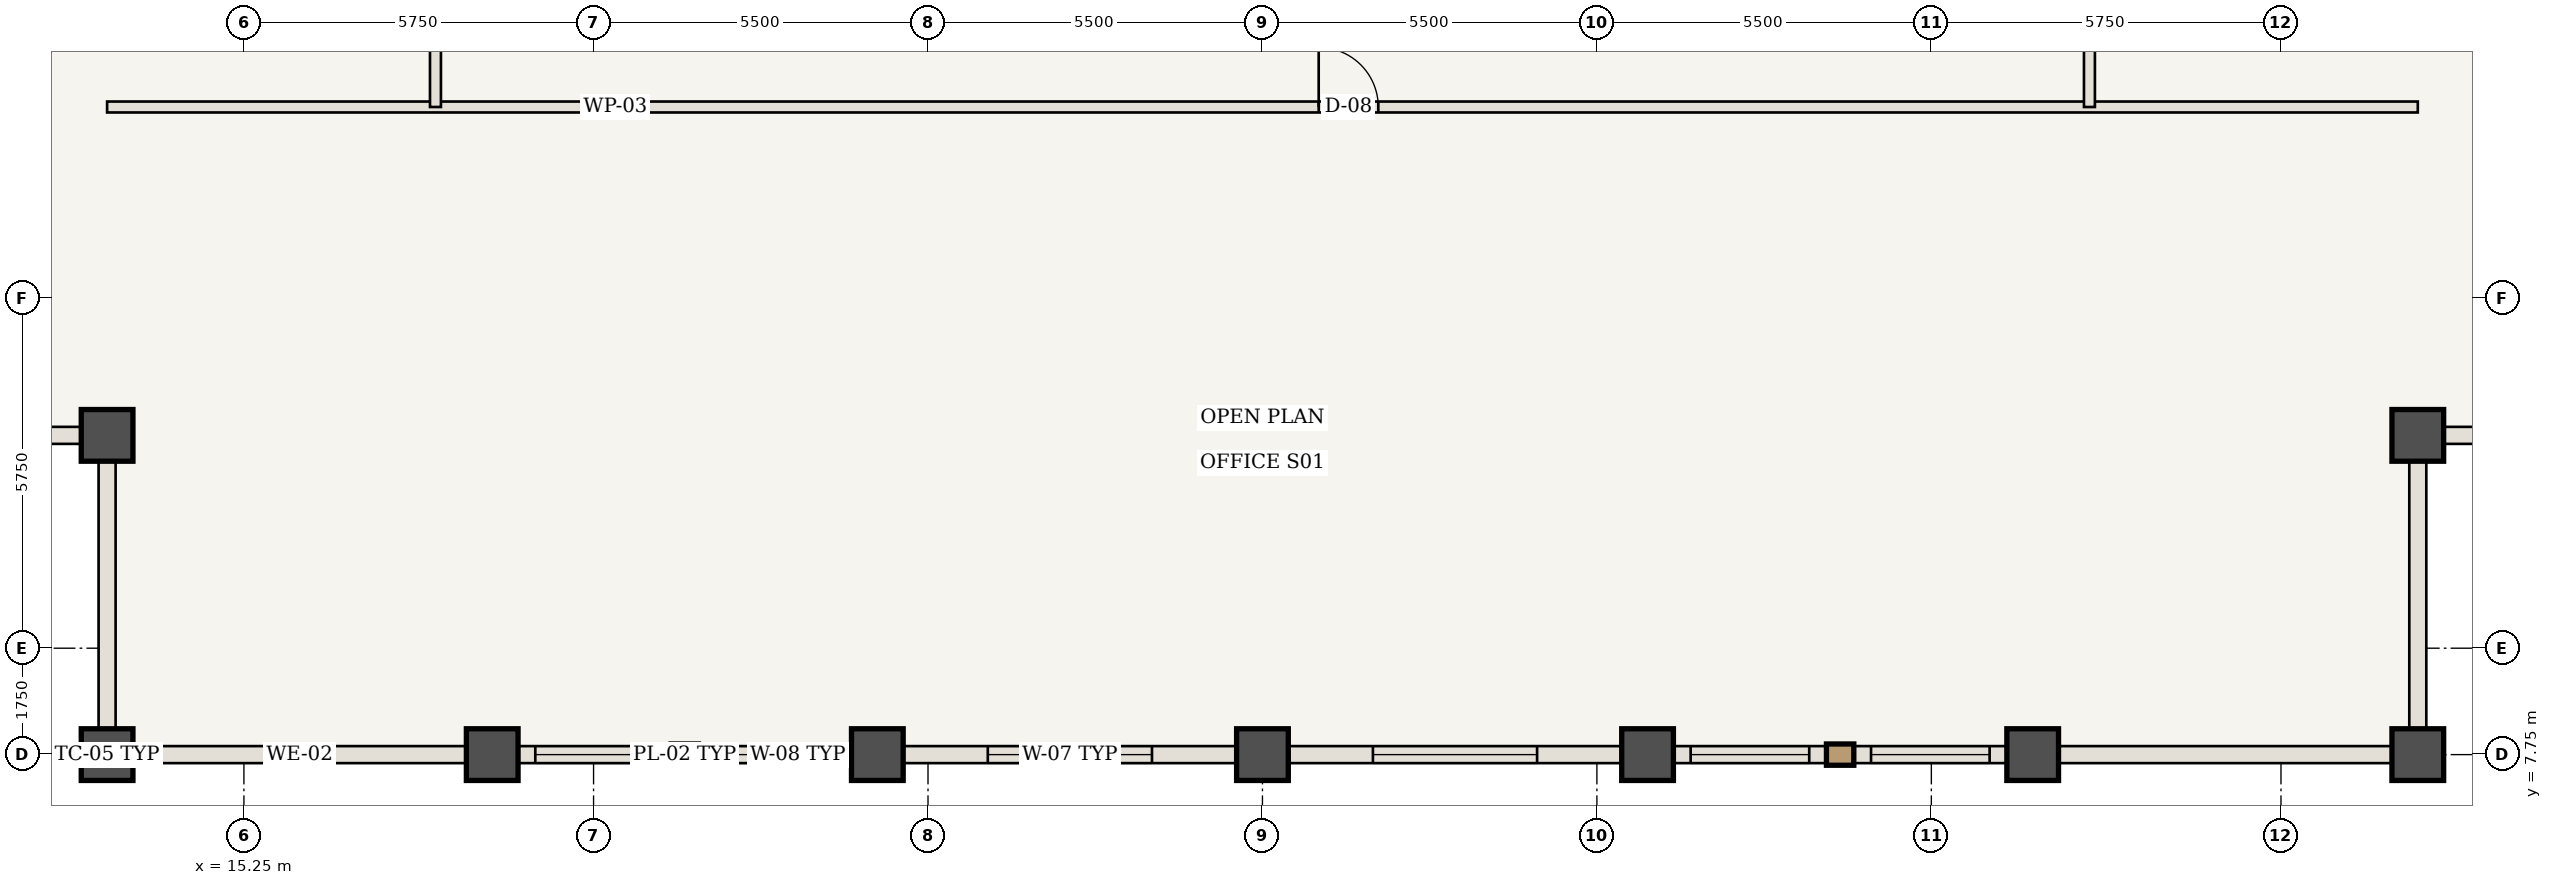
"""IFC4 building model, lengths in metres.
Left out: names, types, materials, properties, quantities, classifications, styles, units other than length and angle.
Written with IfcOpenShell. Run it as: python <this file> out.ifc"""

import sys

from ifc_helpers import new_model, si_unit, direction, frame, frame_2d, origin, origin_2d, place, context, subcontext, project, spatial, rectangle, extrude, element, fill, save


model = new_model("IFC4")
c1 = context("Model", 3, precision=1e-05, world=origin(), true_north=direction((0.0, 1.0)))
c2 = subcontext(c1, "Body", "Model", "MODEL_VIEW")
j1 = project(units=[si_unit("LENGTHUNIT", "METRE"), si_unit("PLANEANGLEUNIT", "RADIAN")], contexts=[c1])
p1 = place(None, origin())
s1 = spatial("IfcSite", under=j1, at=p1, CompositionType="ELEMENT")
p2 = place(p1, origin())
s2 = spatial("IfcBuilding", under=s1, at=p2, CompositionType="ELEMENT")
p3 = place(p2, frame((0.0, 0.0, 194.6)))
s3 = spatial("IfcBuildingStorey", under=s2, at=p3, CompositionType="ELEMENT", Elevation=194.6)
for number, where, z_axis, x_axis in (
    (1, (13.0, 7.75, 0.0), (0.0, 0.0, 1.0), (1.0, 0.0, 0.0)),
    (2, (13.0, 13.0, 0.0), (0.0, 0.0, 1.0), (1.0, 0.0, 0.0)),
    (3, (51.0, 7.75, 0.0), (0.0, 0.0, 1.0), (1.0, 0.0, 0.0)),
    (4, (51.0, 13.0, 0.0), (0.0, 0.0, 1.0), (1.0, 0.0, 0.0)),
    (5, (19.333, 7.75, 0.0), (0.0, 0.0, 1.0), (1.0, 0.0, 0.0)),
    (6, (25.667, 7.75, 0.0), (0.0, 0.0, 1.0), (1.0, 0.0, 0.0)),
    (7, (32.0, 7.75, 0.0), (0.0, 0.0, 1.0), (1.0, 0.0, 0.0)),
    (8, (38.333, 7.75, 0.0), (0.0, 0.0, 1.0), (1.0, 0.0, 0.0)),
    (9, (44.667, 7.75, 0.0), (0.0, 0.0, 1.0), (1.0, 0.0, 0.0)),
):
    element("IfcColumn", number, at=place(p3, frame(where, z_axis=z_axis, x_axis=x_axis)), inside=s3, PredefinedType="COLUMN", context=c2, shape_type="SweptSolid", body=[
        extrude(rectangle(XDim=0.85, YDim=0.85, at=origin_2d()), origin(), (0.0, 0.0, 1.0), 3.85),
    ])
p4 = place(p3, frame((13.0, 18.4, 0.0), z_axis=(0.0, 0.0, 1.0), x_axis=(1.0, 0.0, 0.0)))
e10 = element("IfcWall", 10, at=p4, inside=s3, PredefinedType="STANDARD", context=c2, shape_type="SweptSolid", body=[
    extrude(rectangle(XDim=38.0, YDim=0.18, at=frame_2d((19.0, 0.0))), origin(), (0.0, 0.0, 1.0), 3.685),
])
p5 = place(p4, frame((19.925, 0.0, 0.0)))
e11 = element("IfcOpeningElement", 11, at=p5, cuts=e10, PredefinedType="OPENING", context=c2, shape_type="SweptSolid", body=[
    extrude(rectangle(XDim=0.98, YDim=2.2, at=frame_2d((0.49, 1.1))), frame((0.0, 0.1, 0.0), z_axis=(0.0, -1.0, 0.0), x_axis=(1.0, 0.0, 0.0)), (0.0, 0.0, 1.0), 0.2),
])
p6 = place(p3, frame((18.4, 18.4, 0.0), z_axis=(0.0, 0.0, 1.0), x_axis=(0.0, 1.0, 0.0)))
e12 = element("IfcWall", 12, at=p6, inside=s3, PredefinedType="STANDARD", context=c2, shape_type="SweptSolid", body=[
    extrude(rectangle(XDim=6.317, YDim=0.18, at=frame_2d((3.158, 0.0))), origin(), (0.0, 0.0, 1.0), 3.685),
])
p7 = place(p6, frame((1.208, 0.0, 0.0)))
e13 = element("IfcOpeningElement", 13, at=p7, cuts=e12, PredefinedType="OPENING", context=c2, shape_type="SweptSolid", body=[
    extrude(rectangle(XDim=0.98, YDim=2.2, at=frame_2d((0.49, 1.1))), frame((0.0, 0.1, 0.0), z_axis=(0.0, -1.0, 0.0), x_axis=(1.0, 0.0, 0.0)), (0.0, 0.0, 1.0), 0.2),
])
p8 = place(p3, frame((45.6, 18.4, 0.0), z_axis=(0.0, 0.0, 1.0), x_axis=(0.0, 1.0, 0.0)))
e14 = element("IfcWall", 14, at=p8, inside=s3, PredefinedType="STANDARD", context=c2, shape_type="SweptSolid", body=[
    extrude(rectangle(XDim=13.4, YDim=0.18, at=frame_2d((6.7, 0.0))), origin(), (0.0, 0.0, 1.0), 3.685),
])
p9 = place(p8, frame((6.2, 0.0, 0.0)))
e15 = element("IfcOpeningElement", 15, at=p9, cuts=e14, PredefinedType="OPENING", context=c2, shape_type="SweptSolid", body=[
    extrude(rectangle(XDim=0.98, YDim=2.2, at=frame_2d((0.49, 1.1))), frame((0.0, 0.1, 0.0), z_axis=(0.0, -1.0, 0.0), x_axis=(1.0, 0.0, 0.0)), (0.0, 0.0, 1.0), 0.2),
])
p10 = place(p3, frame((19.333, 7.75, 0.0), z_axis=(0.0, 0.0, 1.0), x_axis=(-1.0, 0.0, 0.0)))
e16 = element("IfcWall", 16, at=p10, inside=s3, PredefinedType="USERDEFINED", context=c2, shape_type="SweptSolid", body=[
    extrude(rectangle(XDim=6.333, YDim=0.28, at=frame_2d((3.167, 0.0))), origin(), (0.0, 0.0, 1.0), 2.985),
])
p11 = place(p3, frame((25.667, 7.75, 0.0), z_axis=(0.0, 0.0, 1.0), x_axis=(-1.0, 0.0, 0.0)))
e17 = element("IfcWall", 17, at=p11, inside=s3, PredefinedType="USERDEFINED", context=c2, shape_type="SweptSolid", body=[
    extrude(rectangle(XDim=6.333, YDim=0.28, at=frame_2d((3.167, 0.0))), origin(), (0.0, 0.0, 1.0), 2.985),
])
p12 = place(p11, frame((0.708, 0.0, 0.85)))
e18 = element("IfcOpeningElement", 18, at=p12, cuts=e17, PredefinedType="OPENING", context=c2, shape_type="SweptSolid", body=[
    extrude(rectangle(XDim=1.95, YDim=1.935, at=frame_2d((0.975, 0.968))), frame((0.0, 0.15, 0.0), z_axis=(0.0, -1.0, 0.0), x_axis=(1.0, 0.0, 0.0)), (0.0, 0.0, 1.0), 0.3),
])
p13 = place(p11, frame((3.675, 0.0, 0.85)))
e19 = element("IfcOpeningElement", 19, at=p13, cuts=e17, PredefinedType="OPENING", context=c2, shape_type="SweptSolid", body=[
    extrude(rectangle(XDim=1.95, YDim=1.935, at=frame_2d((0.975, 0.968))), frame((0.0, 0.15, 0.0), z_axis=(0.0, -1.0, 0.0), x_axis=(1.0, 0.0, 0.0)), (0.0, 0.0, 1.0), 0.3),
])
p14 = place(p3, frame((32.0, 7.75, 0.0), z_axis=(0.0, 0.0, 1.0), x_axis=(-1.0, 0.0, 0.0)))
e20 = element("IfcWall", 20, at=p14, inside=s3, PredefinedType="USERDEFINED", context=c2, shape_type="SweptSolid", body=[
    extrude(rectangle(XDim=6.333, YDim=0.28, at=frame_2d((3.167, 0.0))), origin(), (0.0, 0.0, 1.0), 2.985),
])
p15 = place(p14, frame((1.817, 0.0, 0.85)))
e21 = element("IfcOpeningElement", 21, at=p15, cuts=e20, PredefinedType="OPENING", context=c2, shape_type="SweptSolid", body=[
    extrude(rectangle(XDim=2.7, YDim=1.935, at=frame_2d((1.35, 0.968))), frame((0.0, 0.15, 0.0), z_axis=(0.0, -1.0, 0.0), x_axis=(1.0, 0.0, 0.0)), (0.0, 0.0, 1.0), 0.3),
])
p16 = place(p3, frame((38.333, 7.75, 0.0), z_axis=(0.0, 0.0, 1.0), x_axis=(-1.0, 0.0, 0.0)))
e22 = element("IfcWall", 22, at=p16, inside=s3, PredefinedType="USERDEFINED", context=c2, shape_type="SweptSolid", body=[
    extrude(rectangle(XDim=6.333, YDim=0.28, at=frame_2d((3.167, 0.0))), origin(), (0.0, 0.0, 1.0), 2.985),
])
p17 = place(p16, frame((1.817, 0.0, 0.85)))
e23 = element("IfcOpeningElement", 23, at=p17, cuts=e22, PredefinedType="OPENING", context=c2, shape_type="SweptSolid", body=[
    extrude(rectangle(XDim=2.7, YDim=1.935, at=frame_2d((1.35, 0.968))), frame((0.0, 0.15, 0.0), z_axis=(0.0, -1.0, 0.0), x_axis=(1.0, 0.0, 0.0)), (0.0, 0.0, 1.0), 0.3),
])
p18 = place(p3, frame((44.667, 7.75, 0.0), z_axis=(0.0, 0.0, 1.0), x_axis=(-1.0, 0.0, 0.0)))
e24 = element("IfcWall", 24, at=p18, inside=s3, PredefinedType="USERDEFINED", context=c2, shape_type="SweptSolid", body=[
    extrude(rectangle(XDim=6.333, YDim=0.28, at=frame_2d((3.167, 0.0))), origin(), (0.0, 0.0, 1.0), 2.985),
])
p19 = place(p18, frame((0.708, 0.0, 0.85)))
e25 = element("IfcOpeningElement", 25, at=p19, cuts=e24, PredefinedType="OPENING", context=c2, shape_type="SweptSolid", body=[
    extrude(rectangle(XDim=1.95, YDim=1.935, at=frame_2d((0.975, 0.968))), frame((0.0, 0.15, 0.0), z_axis=(0.0, -1.0, 0.0), x_axis=(1.0, 0.0, 0.0)), (0.0, 0.0, 1.0), 0.3),
])
p20 = place(p18, frame((3.675, 0.0, 0.85)))
e26 = element("IfcOpeningElement", 26, at=p20, cuts=e24, PredefinedType="OPENING", context=c2, shape_type="SweptSolid", body=[
    extrude(rectangle(XDim=1.95, YDim=1.935, at=frame_2d((0.975, 0.968))), frame((0.0, 0.15, 0.0), z_axis=(0.0, -1.0, 0.0), x_axis=(1.0, 0.0, 0.0)), (0.0, 0.0, 1.0), 0.3),
])
p21 = place(p3, frame((51.0, 7.75, 0.0), z_axis=(0.0, 0.0, 1.0), x_axis=(-1.0, 0.0, 0.0)))
e27 = element("IfcWall", 27, at=p21, inside=s3, PredefinedType="USERDEFINED", context=c2, shape_type="SweptSolid", body=[
    extrude(rectangle(XDim=6.333, YDim=0.28, at=frame_2d((3.167, 0.0))), origin(), (0.0, 0.0, 1.0), 2.985),
])
for number, where, z_axis, x_axis in (
    (28, (13.0, 7.75, 0.0), (0.0, 0.0, 1.0), (0.0, 1.0, 0.0)),
    (29, (13.0, 13.0, 0.0), (0.0, 0.0, 1.0), (-1.0, 0.0, 0.0)),
    (30, (51.0, 13.0, 0.0), (0.0, 0.0, 1.0), (0.0, -1.0, 0.0)),
    (31, (56.25, 13.0, 0.0), (0.0, 0.0, 1.0), (-1.0, 0.0, 0.0)),
):
    element("IfcWall", number, at=place(p3, frame(where, z_axis=z_axis, x_axis=x_axis)), inside=s3, PredefinedType="USERDEFINED", context=c2, shape_type="SweptSolid", body=[
        extrude(rectangle(XDim=5.25, YDim=0.28, at=frame_2d((2.625, 0.0))), origin(), (0.0, 0.0, 1.0), 2.985),
    ])
p22 = place(p5, origin())
e32 = element("IfcDoor", 32, at=p22, inside=s3, OperationType="SINGLE_SWING_LEFT", PredefinedType="DOOR", context=c2, shape_type="SweptSolid", body=[
    extrude(rectangle(XDim=0.98, YDim=2.2, at=frame_2d((0.49, 1.1))), frame((0.0, 0.025, 0.0), z_axis=(0.0, -1.0, 0.0), x_axis=(1.0, 0.0, 0.0)), (0.0, 0.0, 1.0), 0.05),
])
fill(e11, e32)
p23 = place(p12, origin())
e33 = element("IfcWindow", 33, at=p23, inside=s3, PartitioningType="SINGLE_PANEL", PredefinedType="WINDOW", context=c2, shape_type="SweptSolid", body=[
    extrude(rectangle(XDim=1.95, YDim=1.935, at=frame_2d((0.975, 0.968))), frame((0.0, 0.03, 0.0), z_axis=(0.0, -1.0, 0.0), x_axis=(1.0, 0.0, 0.0)), (0.0, 0.0, 1.0), 0.06),
])
fill(e18, e33)
p24 = place(p13, origin())
e34 = element("IfcWindow", 34, at=p24, inside=s3, PartitioningType="SINGLE_PANEL", PredefinedType="WINDOW", context=c2, shape_type="SweptSolid", body=[
    extrude(rectangle(XDim=1.95, YDim=1.935, at=frame_2d((0.975, 0.968))), frame((0.0, 0.03, 0.0), z_axis=(0.0, -1.0, 0.0), x_axis=(1.0, 0.0, 0.0)), (0.0, 0.0, 1.0), 0.06),
])
fill(e19, e34)
p25 = place(p15, origin())
e35 = element("IfcWindow", 35, at=p25, inside=s3, PartitioningType="SINGLE_PANEL", PredefinedType="WINDOW", context=c2, shape_type="SweptSolid", body=[
    extrude(rectangle(XDim=2.7, YDim=1.935, at=frame_2d((1.35, 0.968))), frame((0.0, 0.03, 0.0), z_axis=(0.0, -1.0, 0.0), x_axis=(1.0, 0.0, 0.0)), (0.0, 0.0, 1.0), 0.06),
])
fill(e21, e35)
p26 = place(p17, origin())
e36 = element("IfcWindow", 36, at=p26, inside=s3, PartitioningType="SINGLE_PANEL", PredefinedType="WINDOW", context=c2, shape_type="SweptSolid", body=[
    extrude(rectangle(XDim=2.7, YDim=1.935, at=frame_2d((1.35, 0.968))), frame((0.0, 0.03, 0.0), z_axis=(0.0, -1.0, 0.0), x_axis=(1.0, 0.0, 0.0)), (0.0, 0.0, 1.0), 0.06),
])
fill(e23, e36)
p27 = place(p19, origin())
e37 = element("IfcWindow", 37, at=p27, inside=s3, PartitioningType="SINGLE_PANEL", PredefinedType="WINDOW", context=c2, shape_type="SweptSolid", body=[
    extrude(rectangle(XDim=1.95, YDim=1.935, at=frame_2d((0.975, 0.968))), frame((0.0, 0.03, 0.0), z_axis=(0.0, -1.0, 0.0), x_axis=(1.0, 0.0, 0.0)), (0.0, 0.0, 1.0), 0.06),
])
fill(e25, e37)
p28 = place(p20, origin())
e38 = element("IfcWindow", 38, at=p28, inside=s3, PartitioningType="SINGLE_PANEL", PredefinedType="WINDOW", context=c2, shape_type="SweptSolid", body=[
    extrude(rectangle(XDim=1.95, YDim=1.935, at=frame_2d((0.975, 0.968))), frame((0.0, 0.03, 0.0), z_axis=(0.0, -1.0, 0.0), x_axis=(1.0, 0.0, 0.0)), (0.0, 0.0, 1.0), 0.06),
])
fill(e26, e38)
save(model, sys.argv[1])
